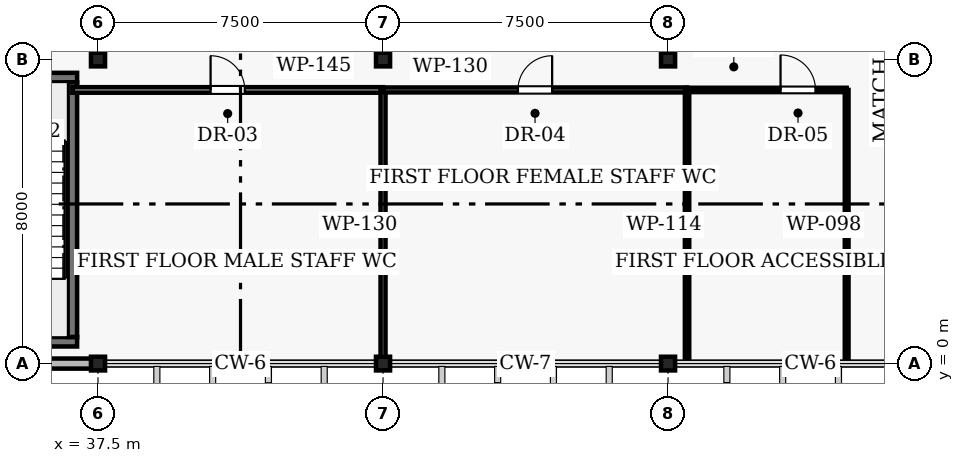
"""IFC4 building model, lengths in metres.
Left out: names, types, materials, properties, quantities, classifications, styles, units other than length and angle.
Written with IfcOpenShell. Run it as: python <this file> out.ifc"""

import sys

from ifc_helpers import new_model, si_unit, direction, frame, frame_2d, origin, origin_2d, place, context, subcontext, project, spatial, rectangle, i_section, extrude, element, fill, save


model = new_model("IFC4")
c1 = context("Model", 3, precision=1e-05, world=origin(), true_north=direction((0.0, 1.0)))
c2 = subcontext(c1, "Body", "Model", "MODEL_VIEW")
j1 = project(units=[si_unit("LENGTHUNIT", "METRE"), si_unit("PLANEANGLEUNIT", "RADIAN")], contexts=[c1])
p1 = place(None, origin())
s1 = spatial("IfcSite", under=j1, at=p1, CompositionType="ELEMENT")
p2 = place(p1, origin())
s2 = spatial("IfcBuilding", under=s1, at=p2, CompositionType="ELEMENT")
p3 = place(p2, frame((0.0, 0.0, 4.5)))
s3 = spatial("IfcBuildingStorey", under=s2, at=p3, CompositionType="ELEMENT", Elevation=4.5)
for number, where, z_axis, x_axis in (
    (1, (37.5, 0.0, 0.0), (0.0, 0.0, 1.0), (1.0, 0.0, 0.0)),
    (2, (37.5, 8.0, 0.0), (0.0, 0.0, 1.0), (1.0, 0.0, 0.0)),
    (3, (45.0, 0.0, 0.0), (0.0, 0.0, 1.0), (1.0, 0.0, 0.0)),
    (4, (45.0, 8.0, 0.0), (0.0, 0.0, 1.0), (1.0, 0.0, 0.0)),
    (5, (52.5, 0.0, 0.0), (0.0, 0.0, 1.0), (1.0, 0.0, 0.0)),
    (6, (52.5, 8.0, 0.0), (0.0, 0.0, 1.0), (1.0, 0.0, 0.0)),
):
    element("IfcColumn", number, at=place(p3, frame(where, z_axis=z_axis, x_axis=x_axis)), inside=s3, PredefinedType="COLUMN", context=c2, shape_type="SweptSolid", body=[
        extrude(i_section(OverallWidth=0.37, OverallDepth=0.36, WebThickness=0.012, FlangeThickness=0.02, FilletRadius=0.015, at=origin_2d()), origin(), (0.0, 0.0, 1.0), 4.28),
    ])
p4 = place(p3, frame((30.08, 0.0, 0.0), z_axis=(0.0, 0.0, 1.0), x_axis=(1.0, 0.0, 0.0)))
e7 = element("IfcWall", 7, at=p4, inside=s3, PredefinedType="SOLIDWALL", context=c2, shape_type="SweptSolid", body=[
    extrude(rectangle(XDim=7.34, YDim=0.265, at=frame_2d((3.67, 0.0))), origin(), (0.0, 0.0, 1.0), 3.85),
])
p5 = place(p4, frame((1.2, 0.0, 1.05)))
e8 = element("IfcOpeningElement", 8, at=p5, cuts=e7, PredefinedType="OPENING", context=c2, shape_type="SweptSolid", body=[
    extrude(rectangle(XDim=1.5, YDim=1.1, at=frame_2d((0.75, 0.55))), frame((0.0, 0.142, 0.0), z_axis=(0.0, -1.0, 0.0), x_axis=(1.0, 0.0, 0.0)), (0.0, 0.0, 1.0), 0.285),
])
p6 = place(p4, frame((4.1, 0.0, 1.05)))
e9 = element("IfcOpeningElement", 9, at=p6, cuts=e7, PredefinedType="OPENING", context=c2, shape_type="SweptSolid", body=[
    extrude(rectangle(XDim=1.5, YDim=1.25, at=frame_2d((0.75, 0.625))), frame((0.0, 0.142, 0.0), z_axis=(0.0, -1.0, 0.0), x_axis=(1.0, 0.0, 0.0)), (0.0, 0.0, 1.0), 0.285),
])
p7 = place(p3, frame((30.55, 0.575, 0.0), z_axis=(0.0, 0.0, 1.0), x_axis=(1.0, 0.0, 0.0)))
e10 = element("IfcWall", 10, at=p7, inside=s3, PredefinedType="SHEAR", context=c2, shape_type="SweptSolid", body=[
    extrude(rectangle(XDim=6.4, YDim=0.25, at=frame_2d((3.2, 0.0))), origin(), (0.0, 0.0, 1.0), 4.5),
])
p8 = place(p3, frame((30.55, 7.525, 0.0), z_axis=(0.0, 0.0, 1.0), x_axis=(1.0, 0.0, 0.0)))
e11 = element("IfcWall", 11, at=p8, inside=s3, PredefinedType="SHEAR", context=c2, shape_type="SweptSolid", body=[
    extrude(rectangle(XDim=6.4, YDim=0.25, at=frame_2d((3.2, 0.0))), origin(), (0.0, 0.0, 1.0), 4.5),
])
p9 = place(p8, frame((0.8, 0.0, 0.0)))
e12 = element("IfcOpeningElement", 12, at=p9, cuts=e11, PredefinedType="OPENING", context=c2, shape_type="SweptSolid", body=[
    extrude(rectangle(XDim=1.1, YDim=2.15, at=frame_2d((0.55, 1.075))), frame((0.0, 0.135, 0.0), z_axis=(0.0, -1.0, 0.0), x_axis=(1.0, 0.0, 0.0)), (0.0, 0.0, 1.0), 0.27),
])
p10 = place(p8, frame((3.775, 0.0, 0.0)))
e13 = element("IfcOpeningElement", 13, at=p10, cuts=e11, PredefinedType="OPENING", context=c2, shape_type="SweptSolid", body=[
    extrude(rectangle(XDim=1.25, YDim=2.15, at=frame_2d((0.625, 1.075))), frame((0.0, 0.135, 0.0), z_axis=(0.0, -1.0, 0.0), x_axis=(1.0, 0.0, 0.0)), (0.0, 0.0, 1.0), 0.27),
])
p11 = place(p3, frame((36.825, 0.7, 0.0), z_axis=(0.0, 0.0, 1.0), x_axis=(0.0, 1.0, 0.0)))
e14 = element("IfcWall", 14, at=p11, inside=s3, PredefinedType="SHEAR", context=c2, shape_type="SweptSolid", body=[
    extrude(rectangle(XDim=6.7, YDim=0.25, at=frame_2d((3.35, 0.0))), origin(), (0.0, 0.0, 1.0), 4.5),
])
p12 = place(p3, frame((36.825, 7.2, 0.0), z_axis=(0.0, 0.0, 1.0), x_axis=(1.0, 0.0, 0.0)))
e15 = element("IfcWall", 15, at=p12, inside=s3, PredefinedType="PARTITIONING", context=c2, shape_type="SweptSolid", body=[
    extrude(rectangle(XDim=8.175, YDim=0.145, at=frame_2d((4.087, 0.0))), origin(), (0.0, 0.0, 1.0), 3.7),
])
p13 = place(p12, frame((3.637, 0.0, 0.0)))
e16 = element("IfcOpeningElement", 16, at=p13, cuts=e15, PredefinedType="OPENING", context=c2, shape_type="SweptSolid", body=[
    extrude(rectangle(XDim=0.9, YDim=2.08, at=frame_2d((0.45, 1.04))), frame((0.0, 0.083, 0.0), z_axis=(0.0, -1.0, 0.0), x_axis=(1.0, 0.0, 0.0)), (0.0, 0.0, 1.0), 0.165),
])
p14 = place(p3, frame((45.0, 0.08, 0.0), z_axis=(0.0, 0.0, 1.0), x_axis=(0.0, 1.0, 0.0)))
e17 = element("IfcWall", 17, at=p14, inside=s3, PredefinedType="PARTITIONING", context=c2, shape_type="SweptSolid", body=[
    extrude(rectangle(XDim=7.12, YDim=0.13, at=frame_2d((3.56, 0.0))), origin(), (0.0, 0.0, 1.0), 3.7),
])
p15 = place(p3, frame((45.0, 7.2, 0.0), z_axis=(0.0, 0.0, 1.0), x_axis=(1.0, 0.0, 0.0)))
e18 = element("IfcWall", 18, at=p15, inside=s3, PredefinedType="PARTITIONING", context=c2, shape_type="SweptSolid", body=[
    extrude(rectangle(XDim=8.0, YDim=0.13, at=frame_2d((4.0, 0.0))), origin(), (0.0, 0.0, 1.0), 3.7),
])
p16 = place(p15, frame((3.55, 0.0, 0.0)))
e19 = element("IfcOpeningElement", 19, at=p16, cuts=e18, PredefinedType="OPENING", context=c2, shape_type="SweptSolid", body=[
    extrude(rectangle(XDim=0.9, YDim=2.14, at=frame_2d((0.45, 1.07))), frame((0.0, 0.075, 0.0), z_axis=(0.0, -1.0, 0.0), x_axis=(1.0, 0.0, 0.0)), (0.0, 0.0, 1.0), 0.15),
])
p17 = place(p3, frame((53.0, 0.08, 0.0), z_axis=(0.0, 0.0, 1.0), x_axis=(0.0, 1.0, 0.0)))
e20 = element("IfcWall", 20, at=p17, inside=s3, PredefinedType="PARTITIONING", context=c2, shape_type="SweptSolid", body=[
    extrude(rectangle(XDim=7.12, YDim=0.114, at=frame_2d((3.56, 0.0))), origin(), (0.0, 0.0, 1.0), 3.7),
])
p18 = place(p3, frame((53.0, 7.2, 0.0), z_axis=(0.0, 0.0, 1.0), x_axis=(1.0, 0.0, 0.0)))
e21 = element("IfcWall", 21, at=p18, inside=s3, PredefinedType="PARTITIONING", context=c2, shape_type="SweptSolid", body=[
    extrude(rectangle(XDim=4.2, YDim=0.114, at=frame_2d((2.1, 0.0))), origin(), (0.0, 0.0, 1.0), 3.7),
])
p19 = place(p18, frame((2.46, 0.0, 0.0)))
e22 = element("IfcOpeningElement", 22, at=p19, cuts=e21, PredefinedType="OPENING", context=c2, shape_type="SweptSolid", body=[
    extrude(rectangle(XDim=0.92, YDim=2.1, at=frame_2d((0.46, 1.05))), frame((0.0, 0.067, 0.0), z_axis=(0.0, -1.0, 0.0), x_axis=(1.0, 0.0, 0.0)), (0.0, 0.0, 1.0), 0.134),
])
p20 = place(p3, frame((57.2, 0.08, 0.0), z_axis=(0.0, 0.0, 1.0), x_axis=(0.0, 1.0, 0.0)))
e23 = element("IfcWall", 23, at=p20, inside=s3, PredefinedType="PARTITIONING", context=c2, shape_type="SweptSolid", body=[
    extrude(rectangle(XDim=7.12, YDim=0.098, at=frame_2d((3.56, 0.0))), origin(), (0.0, 0.0, 1.0), 3.7),
])
p21 = place(p13, origin())
e24 = element("IfcDoor", 24, at=p21, inside=s3, OperationType="SINGLE_SWING_LEFT", PredefinedType="DOOR", context=c2, shape_type="SweptSolid", body=[
    extrude(rectangle(XDim=0.9, YDim=2.08, at=frame_2d((0.45, 1.04))), frame((0.0, 0.025, 0.0), z_axis=(0.0, -1.0, 0.0), x_axis=(1.0, 0.0, 0.0)), (0.0, 0.0, 1.0), 0.05),
])
fill(e16, e24)
p22 = place(p16, origin())
e25 = element("IfcDoor", 25, at=p22, inside=s3, OperationType="SINGLE_SWING_RIGHT", PredefinedType="DOOR", context=c2, shape_type="SweptSolid", body=[
    extrude(rectangle(XDim=0.9, YDim=2.14, at=frame_2d((0.45, 1.07))), frame((0.0, 0.025, 0.0), z_axis=(0.0, -1.0, 0.0), x_axis=(1.0, 0.0, 0.0)), (0.0, 0.0, 1.0), 0.05),
])
fill(e19, e25)
p23 = place(p19, origin())
e26 = element("IfcDoor", 26, at=p23, inside=s3, OperationType="SINGLE_SWING_LEFT", PredefinedType="DOOR", context=c2, shape_type="SweptSolid", body=[
    extrude(rectangle(XDim=0.92, YDim=2.1, at=frame_2d((0.46, 1.05))), frame((0.0, 0.025, 0.0), z_axis=(0.0, -1.0, 0.0), x_axis=(1.0, 0.0, 0.0)), (0.0, 0.0, 1.0), 0.05),
])
fill(e22, e26)
save(model, sys.argv[1])
